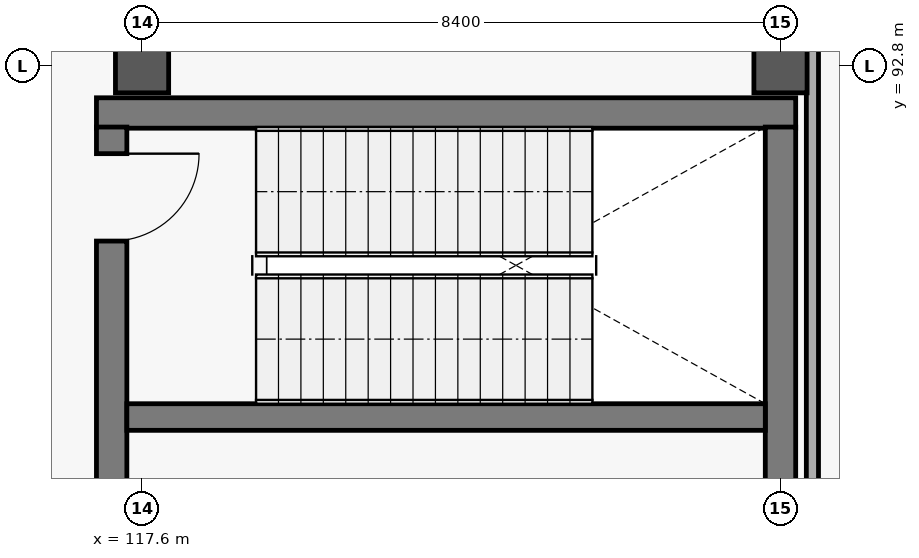
"""IFC4 building model, lengths in metres.
Left out: names, types, materials, properties, quantities, classifications, styles, units other than length and angle.
Written with IfcOpenShell. Run it as: python <this file> out.ifc"""

import sys

from ifc_helpers import new_model, si_unit, direction, frame, frame_2d, origin, origin_2d, place, context, subcontext, project, spatial, rectangle, extrude, element, fill, save


model = new_model("IFC4")
c1 = context("Model", 3, precision=1e-05, world=origin(), true_north=direction((0.0, 1.0)))
c2 = subcontext(c1, "Body", "Model", "MODEL_VIEW")
j1 = project(units=[si_unit("LENGTHUNIT", "METRE"), si_unit("PLANEANGLEUNIT", "RADIAN")], contexts=[c1])
p1 = place(None, origin())
s1 = spatial("IfcSite", under=j1, at=p1, CompositionType="ELEMENT")
p2 = place(p1, origin())
s2 = spatial("IfcBuilding", under=s1, at=p2, CompositionType="ELEMENT")
p3 = place(p2, origin())
s3 = spatial("IfcBuildingStorey", under=s2, at=p3, CompositionType="ELEMENT", Elevation=0.0)
for number, where, z_axis, x_axis in (
    (1, (117.6, 92.8, 0.0), (0.0, 0.0, 1.0), (1.0, 0.0, 0.0)),
    (2, (126.0, 92.8, 0.0), (0.0, 0.0, 1.0), (1.0, 0.0, 0.0)),
):
    element("IfcColumn", number, at=place(p3, frame(where, z_axis=z_axis, x_axis=x_axis)), inside=s3, PredefinedType="COLUMN", context=c2, shape_type="SweptSolid", body=[
        extrude(rectangle(XDim=0.7, YDim=0.7, at=origin_2d()), origin(), (0.0, 0.0, 1.0), 5.4),
    ])
p4 = place(p3, frame((126.2, 92.185, 0.0), z_axis=(0.0, 0.0, 1.0), x_axis=(-1.0, 0.0, 0.0)))
e3 = element("IfcWall", 3, at=p4, inside=s3, PredefinedType="SHEAR", context=c2, shape_type="SweptSolid", body=[
    extrude(rectangle(XDim=9.2, YDim=0.4, at=frame_2d((4.6, 0.0))), origin(), (0.0, 0.0, 1.0), 5.08),
])
p5 = place(p3, frame((117.2, 92.0, 0.0), z_axis=(0.0, 0.0, 1.0), x_axis=(0.0, -1.0, 0.0)))
e4 = element("IfcWall", 4, at=p5, inside=s3, PredefinedType="SHEAR", context=c2, shape_type="SweptSolid", body=[
    extrude(rectangle(XDim=7.2, YDim=0.4, at=frame_2d((3.6, 0.0))), origin(), (0.0, 0.0, 1.0), 5.08),
])
p6 = place(p5, frame((0.35, 0.0, 0.0)))
e5 = element("IfcOpeningElement", 5, at=p6, cuts=e4, PredefinedType="OPENING", context=c2, shape_type="SweptSolid", body=[
    extrude(rectangle(XDim=1.15, YDim=2.2, at=frame_2d((0.575, 1.1))), frame((0.0, 0.21, 0.0), z_axis=(0.0, -1.0, 0.0), x_axis=(1.0, 0.0, 0.0)), (0.0, 0.0, 1.0), 0.42),
])
p7 = place(p3, frame((126.0, 84.8, 0.0), z_axis=(0.0, 0.0, 1.0), x_axis=(0.0, 1.0, 0.0)))
e6 = element("IfcWall", 6, at=p7, inside=s3, PredefinedType="SHEAR", context=c2, shape_type="SweptSolid", body=[
    extrude(rectangle(XDim=7.2, YDim=0.4, at=frame_2d((3.6, 0.0))), origin(), (0.0, 0.0, 1.0), 5.08),
])
p8 = place(p3, frame((117.4, 88.185, 0.0), z_axis=(0.0, 0.0, 1.0), x_axis=(1.0, 0.0, 0.0)))
e7 = element("IfcWall", 7, at=p8, inside=s3, PredefinedType="SHEAR", context=c2, shape_type="SweptSolid", body=[
    extrude(rectangle(XDim=8.4, YDim=0.35, at=frame_2d((4.2, 0.0))), origin(), (0.0, 0.0, 1.0), 5.08),
])
p9 = place(p3, frame((126.42, 84.42, 0.0), z_axis=(0.0, 0.0, 1.0), x_axis=(0.0, 1.0, 0.0)))
e8 = element("IfcWall", 8, at=p9, inside=s3, PredefinedType="PARTITIONING", context=c2, shape_type="SweptSolid", body=[
    extrude(rectangle(XDim=24.88, YDim=0.16, at=frame_2d((12.44, 0.0))), origin(), (0.0, 0.0, 1.0), 4.18),
])
p10 = place(p6, origin())
e9 = element("IfcDoor", 9, at=p10, inside=s3, OperationType="SINGLE_SWING_LEFT", PredefinedType="DOOR", context=c2, shape_type="SweptSolid", body=[
    extrude(rectangle(XDim=1.15, YDim=2.2, at=frame_2d((0.575, 1.1))), frame((0.0, 0.025, 0.0), z_axis=(0.0, -1.0, 0.0), x_axis=(1.0, 0.0, 0.0)), (0.0, 0.0, 1.0), 0.05),
])
fill(e5, e9)
save(model, sys.argv[1])
